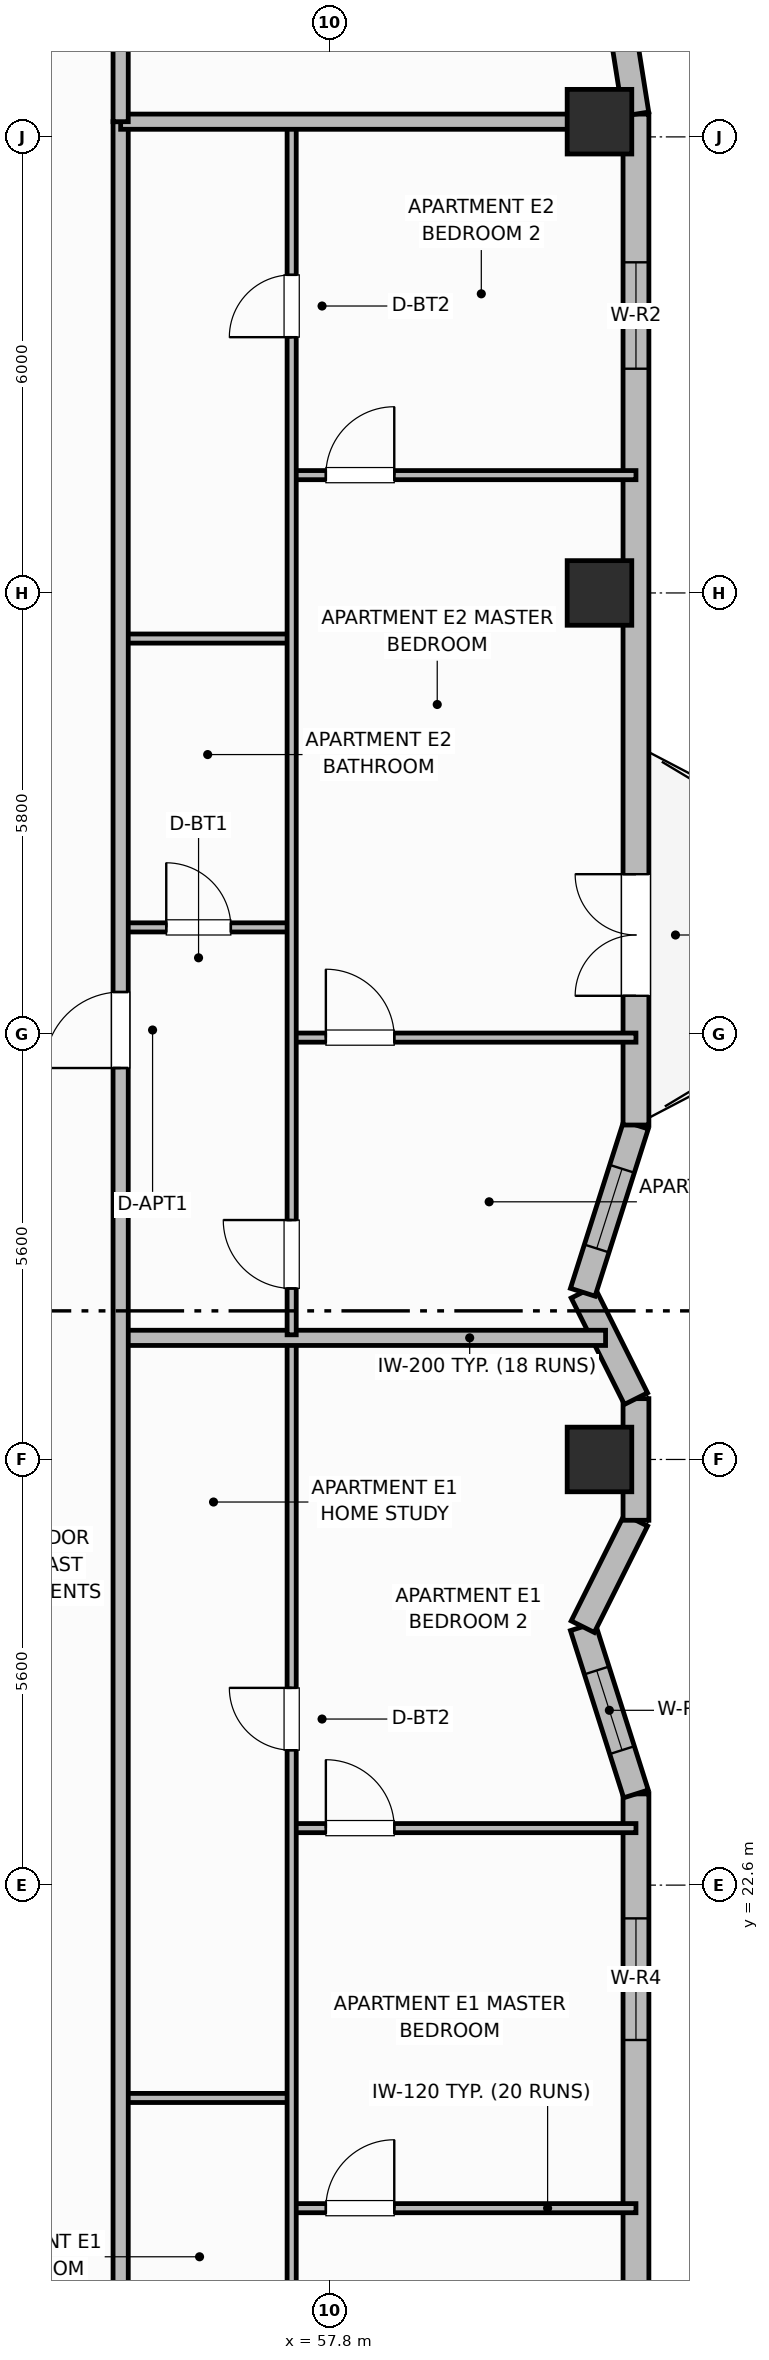
"""IFC4 building model, lengths in metres.
Left out: names, types, materials, properties, quantities, classifications, styles, units other than length and angle.
Written with IfcOpenShell. Run it as: python <this file> out.ifc"""

import sys

from ifc_helpers import new_model, si_unit, direction, frame, frame_2d, origin, origin_2d, place, context, subcontext, project, spatial, rectangle, extrude, element, fill, save


model = new_model("IFC4")
c1 = context("Model", 3, precision=1e-05, world=origin(), true_north=direction((0.0, 1.0)))
c2 = subcontext(c1, "Body", "Model", "MODEL_VIEW")
j1 = project(units=[si_unit("LENGTHUNIT", "METRE"), si_unit("PLANEANGLEUNIT", "RADIAN")], contexts=[c1])
p1 = place(None, origin())
s1 = spatial("IfcSite", under=j1, at=p1, CompositionType="ELEMENT")
p2 = place(p1, origin())
s2 = spatial("IfcBuilding", under=s1, at=p2, CompositionType="ELEMENT")
p3 = place(p2, frame((0.0, 0.0, 203.1)))
s3 = spatial("IfcBuildingStorey", under=s2, at=p3, CompositionType="ELEMENT", Elevation=203.1)
for number, where, z_axis, x_axis in (
    (1, (61.35, 28.2, 0.0), (0.0, 0.0, 1.0), (1.0, 0.0, 0.0)),
    (2, (61.35, 39.6, 0.0), (0.0, 0.0, 1.0), (1.0, 0.0, 0.0)),
    (3, (61.35, 45.8, 0.0), (0.0, 0.0, 1.0), (1.0, 0.0, 0.0)),
):
    element("IfcColumn", number, at=place(p3, frame(where, z_axis=z_axis, x_axis=x_axis)), inside=s3, PredefinedType="COLUMN", context=c2, shape_type="SweptSolid", body=[
        extrude(rectangle(XDim=0.85, YDim=0.85, at=origin_2d()), origin(), (0.0, 0.0, 1.0), 4.2),
    ])
p4 = place(p3, frame((61.83, 15.35, 0.0), z_axis=(0.0, 0.0, 1.0), x_axis=(0.0, 1.0, 0.0)))
e4 = element("IfcWall", 4, at=p4, inside=s3, PredefinedType="SOLIDWALL", context=c2, shape_type="SweptSolid", body=[
    extrude(rectangle(XDim=8.45, YDim=0.34, at=frame_2d((4.225, 0.0))), origin(), (0.0, 0.0, 1.0), 3.22),
])
p5 = place(p4, frame((5.212, 0.0, 0.85)))
e5 = element("IfcOpeningElement", 5, at=p5, cuts=e4, PredefinedType="OPENING", context=c2, shape_type="SweptSolid", body=[
    extrude(rectangle(XDim=1.6, YDim=1.9, at=frame_2d((0.8, 0.95))), frame((0.0, 0.18, 0.0), z_axis=(0.0, -1.0, 0.0), x_axis=(1.0, 0.0, 0.0)), (0.0, 0.0, 1.0), 0.36),
])
p6 = place(p3, frame((61.83, 23.8, 0.0), z_axis=(0.0, 0.0, 1.0), x_axis=(-0.303286588318, 0.95289938889, 0.0)))
e6 = element("IfcWall", 6, at=p6, inside=s3, PredefinedType="SOLIDWALL", context=c2, shape_type="SweptSolid", body=[
    extrude(rectangle(XDim=2.309, YDim=0.34, at=frame_2d((1.154, 0.0))), origin(), (0.0, 0.0, 1.0), 3.22),
])
p7 = place(p6, frame((0.604, 0.0, 0.95)))
e7 = element("IfcOpeningElement", 7, at=p7, cuts=e6, PredefinedType="OPENING", context=c2, shape_type="SweptSolid", body=[
    extrude(rectangle(XDim=1.1, YDim=1.65, at=frame_2d((0.55, 0.825))), frame((0.0, 0.18, 0.0), z_axis=(0.0, -1.0, 0.0), x_axis=(1.0, 0.0, 0.0)), (0.0, 0.0, 1.0), 0.36),
])
p8 = place(p3, frame((61.13, 26.0, 0.0), z_axis=(0.0, 0.0, 1.0), x_axis=(0.447338371726, 0.894364792007, 0.0)))
e8 = element("IfcWall", 8, at=p8, inside=s3, PredefinedType="SOLIDWALL", context=c2, shape_type="SweptSolid", body=[
    extrude(rectangle(XDim=1.565, YDim=0.34, at=frame_2d((0.783, 0.0))), origin(), (0.0, 0.0, 1.0), 3.22),
])
p9 = place(p3, frame((61.83, 27.4, 0.0), z_axis=(0.0, 0.0, 1.0), x_axis=(0.0, 1.0, 0.0)))
e9 = element("IfcWall", 9, at=p9, inside=s3, PredefinedType="SOLIDWALL", context=c2, shape_type="SweptSolid", body=[
    extrude(rectangle(XDim=1.6, YDim=0.34, at=frame_2d((0.8, 0.0))), origin(), (0.0, 0.0, 1.0), 3.22),
])
p10 = place(p3, frame((61.83, 29.0, 0.0), z_axis=(0.0, 0.0, 1.0), x_axis=(-0.447338371726, 0.894364792007, 0.0)))
e10 = element("IfcWall", 10, at=p10, inside=s3, PredefinedType="SOLIDWALL", context=c2, shape_type="SweptSolid", body=[
    extrude(rectangle(XDim=1.565, YDim=0.34, at=frame_2d((0.783, 0.0))), origin(), (0.0, 0.0, 1.0), 3.22),
])
p11 = place(p3, frame((61.13, 30.4, 0.0), z_axis=(0.0, 0.0, 1.0), x_axis=(0.303256029766, 0.952909114454, 0.0)))
e11 = element("IfcWall", 11, at=p11, inside=s3, PredefinedType="SOLIDWALL", context=c2, shape_type="SweptSolid", body=[
    extrude(rectangle(XDim=2.309, YDim=0.34, at=frame_2d((1.154, 0.0))), origin(), (0.0, 0.0, 1.0), 3.22),
])
p12 = place(p11, frame((0.604, 0.0, 0.95)))
e12 = element("IfcOpeningElement", 12, at=p12, cuts=e11, PredefinedType="OPENING", context=c2, shape_type="SweptSolid", body=[
    extrude(rectangle(XDim=1.1, YDim=1.65, at=frame_2d((0.55, 0.825))), frame((0.0, 0.18, 0.0), z_axis=(0.0, -1.0, 0.0), x_axis=(1.0, 0.0, 0.0)), (0.0, 0.0, 1.0), 0.36),
])
p13 = place(p3, frame((61.83, 32.6, 0.0), z_axis=(0.0, 0.0, 1.0), x_axis=(0.0, 1.0, 0.0)))
e13 = element("IfcWall", 13, at=p13, inside=s3, PredefinedType="SOLIDWALL", context=c2, shape_type="SweptSolid", body=[
    extrude(rectangle(XDim=13.3, YDim=0.34, at=frame_2d((6.65, 0.0))), origin(), (0.0, 0.0, 1.0), 3.22),
])
p14 = place(p13, frame((1.7, 0.0, 0.0)))
e14 = element("IfcOpeningElement", 14, at=p14, cuts=e13, PredefinedType="OPENING", context=c2, shape_type="SweptSolid", body=[
    extrude(rectangle(XDim=1.6, YDim=2.1, at=frame_2d((0.8, 1.05))), frame((0.0, 0.18, 0.0), z_axis=(0.0, -1.0, 0.0), x_axis=(1.0, 0.0, 0.0)), (0.0, 0.0, 1.0), 0.36),
])
p15 = place(p13, frame((9.95, 0.0, 0.85)))
e15 = element("IfcOpeningElement", 15, at=p15, cuts=e13, PredefinedType="OPENING", context=c2, shape_type="SweptSolid", body=[
    extrude(rectangle(XDim=1.4, YDim=1.85, at=frame_2d((0.7, 0.925))), frame((0.0, 0.18, 0.0), z_axis=(0.0, -1.0, 0.0), x_axis=(1.0, 0.0, 0.0)), (0.0, 0.0, 1.0), 0.36),
])
p16 = place(p3, frame((61.83, 45.9, 0.0), z_axis=(0.0, 0.0, 1.0), x_axis=(-0.156481329164, 0.987680916907, 0.0)))
e16 = element("IfcWall", 16, at=p16, inside=s3, PredefinedType="SOLIDWALL", context=c2, shape_type="SweptSolid", body=[
    extrude(rectangle(XDim=1.136, YDim=0.34, at=frame_2d((0.568, 0.0))), origin(), (0.0, 0.0, 1.0), 3.22),
])
p17 = place(p3, frame((55.05, 19.8, 0.0), z_axis=(0.0, 0.0, 1.0), x_axis=(1.0, 0.0, 0.0)))
e17 = element("IfcWall", 17, at=p17, inside=s3, PredefinedType="PARTITIONING", context=c2, shape_type="SweptSolid", body=[
    extrude(rectangle(XDim=2.25, YDim=0.12, at=frame_2d((1.125, 0.0))), origin(), (0.0, 0.0, 1.0), 3.05),
])
p18 = place(p3, frame((57.3, 18.35, 0.0), z_axis=(0.0, 0.0, 1.0), x_axis=(1.0, 0.0, 0.0)))
e18 = element("IfcWall", 18, at=p18, inside=s3, PredefinedType="PARTITIONING", context=c2, shape_type="SweptSolid", body=[
    extrude(rectangle(XDim=4.53, YDim=0.12, at=frame_2d((2.265, 0.0))), origin(), (0.0, 0.0, 1.0), 3.05),
])
p19 = place(p18, frame((0.45, 0.0, 0.0)))
e19 = element("IfcOpeningElement", 19, at=p19, cuts=e18, PredefinedType="OPENING", context=c2, shape_type="SweptSolid", body=[
    extrude(rectangle(XDim=0.9, YDim=2.1, at=frame_2d((0.45, 1.05))), frame((0.0, 0.07, 0.0), z_axis=(0.0, -1.0, 0.0), x_axis=(1.0, 0.0, 0.0)), (0.0, 0.0, 1.0), 0.14),
])
p20 = place(p3, frame((57.3, 23.35, 0.0), z_axis=(0.0, 0.0, 1.0), x_axis=(1.0, 0.0, 0.0)))
e20 = element("IfcWall", 20, at=p20, inside=s3, PredefinedType="PARTITIONING", context=c2, shape_type="SweptSolid", body=[
    extrude(rectangle(XDim=4.53, YDim=0.12, at=frame_2d((2.265, 0.0))), origin(), (0.0, 0.0, 1.0), 3.05),
])
p21 = place(p20, frame((0.45, 0.0, 0.0)))
e21 = element("IfcOpeningElement", 21, at=p21, cuts=e20, PredefinedType="OPENING", context=c2, shape_type="SweptSolid", body=[
    extrude(rectangle(XDim=0.9, YDim=2.1, at=frame_2d((0.45, 1.05))), frame((0.0, 0.07, 0.0), z_axis=(0.0, -1.0, 0.0), x_axis=(1.0, 0.0, 0.0)), (0.0, 0.0, 1.0), 0.14),
])
p22 = place(p3, frame((57.3, 10.64, 0.0), z_axis=(0.0, 0.0, 1.0), x_axis=(0.0, 1.0, 0.0)))
e22 = element("IfcWall", 22, at=p22, inside=s3, PredefinedType="PARTITIONING", context=c2, shape_type="SweptSolid", body=[
    extrude(rectangle(XDim=19.12, YDim=0.12, at=frame_2d((9.56, 0.0))), origin(), (0.0, 0.0, 1.0), 3.05),
])
p23 = place(p22, frame((0.41, 0.0, 0.0)))
e23 = element("IfcOpeningElement", 23, at=p23, cuts=e22, PredefinedType="OPENING", context=c2, shape_type="SweptSolid", body=[
    extrude(rectangle(XDim=0.9, YDim=2.1, at=frame_2d((0.45, 1.05))), frame((0.0, 0.07, 0.0), z_axis=(0.0, -1.0, 0.0), x_axis=(1.0, 0.0, 0.0)), (0.0, 0.0, 1.0), 0.14),
])
p24 = place(p22, frame((13.735, 0.0, 0.0)))
e24 = element("IfcOpeningElement", 24, at=p24, cuts=e22, PredefinedType="OPENING", context=c2, shape_type="SweptSolid", body=[
    extrude(rectangle(XDim=0.82, YDim=2.08, at=frame_2d((0.41, 1.04))), frame((0.0, 0.07, 0.0), z_axis=(0.0, -1.0, 0.0), x_axis=(1.0, 0.0, 0.0)), (0.0, 0.0, 1.0), 0.14),
])
p25 = place(p3, frame((55.05, 29.8, 0.0), z_axis=(0.0, 0.0, 1.0), x_axis=(1.0, 0.0, 0.0)))
e25 = element("IfcWall", 25, at=p25, inside=s3, PredefinedType="PARTITIONING", context=c2, shape_type="SweptSolid", body=[
    extrude(rectangle(XDim=6.38, YDim=0.2, at=frame_2d((3.19, 0.0))), origin(), (0.0, 0.0, 1.0), 3.05),
])
p26 = place(p3, frame((55.05, 35.2, 0.0), z_axis=(0.0, 0.0, 1.0), x_axis=(1.0, 0.0, 0.0)))
e26 = element("IfcWall", 26, at=p26, inside=s3, PredefinedType="PARTITIONING", context=c2, shape_type="SweptSolid", body=[
    extrude(rectangle(XDim=2.25, YDim=0.12, at=frame_2d((1.125, 0.0))), origin(), (0.0, 0.0, 1.0), 3.05),
])
p27 = place(p26, frame((0.6, 0.0, 0.0)))
e27 = element("IfcOpeningElement", 27, at=p27, cuts=e26, PredefinedType="OPENING", context=c2, shape_type="SweptSolid", body=[
    extrude(rectangle(XDim=0.85, YDim=2.1, at=frame_2d((0.425, 1.05))), frame((0.0, 0.07, 0.0), z_axis=(0.0, -1.0, 0.0), x_axis=(1.0, 0.0, 0.0)), (0.0, 0.0, 1.0), 0.14),
])
p28 = place(p3, frame((55.05, 39.0, 0.0), z_axis=(0.0, 0.0, 1.0), x_axis=(1.0, 0.0, 0.0)))
e28 = element("IfcWall", 28, at=p28, inside=s3, PredefinedType="PARTITIONING", context=c2, shape_type="SweptSolid", body=[
    extrude(rectangle(XDim=2.25, YDim=0.12, at=frame_2d((1.125, 0.0))), origin(), (0.0, 0.0, 1.0), 3.05),
])
p29 = place(p3, frame((57.3, 33.75, 0.0), z_axis=(0.0, 0.0, 1.0), x_axis=(1.0, 0.0, 0.0)))
e29 = element("IfcWall", 29, at=p29, inside=s3, PredefinedType="PARTITIONING", context=c2, shape_type="SweptSolid", body=[
    extrude(rectangle(XDim=4.53, YDim=0.12, at=frame_2d((2.265, 0.0))), origin(), (0.0, 0.0, 1.0), 3.05),
])
p30 = place(p29, frame((0.45, 0.0, 0.0)))
e30 = element("IfcOpeningElement", 30, at=p30, cuts=e29, PredefinedType="OPENING", context=c2, shape_type="SweptSolid", body=[
    extrude(rectangle(XDim=0.9, YDim=2.1, at=frame_2d((0.45, 1.05))), frame((0.0, 0.07, 0.0), z_axis=(0.0, -1.0, 0.0), x_axis=(1.0, 0.0, 0.0)), (0.0, 0.0, 1.0), 0.14),
])
p31 = place(p3, frame((57.3, 41.15, 0.0), z_axis=(0.0, 0.0, 1.0), x_axis=(1.0, 0.0, 0.0)))
e31 = element("IfcWall", 31, at=p31, inside=s3, PredefinedType="PARTITIONING", context=c2, shape_type="SweptSolid", body=[
    extrude(rectangle(XDim=4.53, YDim=0.12, at=frame_2d((2.265, 0.0))), origin(), (0.0, 0.0, 1.0), 3.05),
])
p32 = place(p31, frame((0.45, 0.0, 0.0)))
e32 = element("IfcOpeningElement", 32, at=p32, cuts=e31, PredefinedType="OPENING", context=c2, shape_type="SweptSolid", body=[
    extrude(rectangle(XDim=0.9, YDim=2.1, at=frame_2d((0.45, 1.05))), frame((0.0, 0.07, 0.0), z_axis=(0.0, -1.0, 0.0), x_axis=(1.0, 0.0, 0.0)), (0.0, 0.0, 1.0), 0.14),
])
p33 = place(p3, frame((57.3, 29.84, 0.0), z_axis=(0.0, 0.0, 1.0), x_axis=(0.0, 1.0, 0.0)))
e33 = element("IfcWall", 33, at=p33, inside=s3, PredefinedType="PARTITIONING", context=c2, shape_type="SweptSolid", body=[
    extrude(rectangle(XDim=15.92, YDim=0.12, at=frame_2d((7.96, 0.0))), origin(), (0.0, 0.0, 1.0), 3.05),
])
p34 = place(p33, frame((0.61, 0.0, 0.0)))
e34 = element("IfcOpeningElement", 34, at=p34, cuts=e33, PredefinedType="OPENING", context=c2, shape_type="SweptSolid", body=[
    extrude(rectangle(XDim=0.9, YDim=2.1, at=frame_2d((0.45, 1.05))), frame((0.0, 0.07, 0.0), z_axis=(0.0, -1.0, 0.0), x_axis=(1.0, 0.0, 0.0)), (0.0, 0.0, 1.0), 0.14),
])
p35 = place(p33, frame((13.125, 0.0, 0.0)))
e35 = element("IfcOpeningElement", 35, at=p35, cuts=e33, PredefinedType="OPENING", context=c2, shape_type="SweptSolid", body=[
    extrude(rectangle(XDim=0.82, YDim=2.08, at=frame_2d((0.41, 1.04))), frame((0.0, 0.07, 0.0), z_axis=(0.0, -1.0, 0.0), x_axis=(1.0, 0.0, 0.0)), (0.0, 0.0, 1.0), 0.14),
])
p36 = place(p3, frame((55.05, 10.6, 0.0), z_axis=(0.0, 0.0, 1.0), x_axis=(0.0, 1.0, 0.0)))
e36 = element("IfcWall", 36, at=p36, inside=s3, PredefinedType="PARTITIONING", context=c2, shape_type="SweptSolid", body=[
    extrude(rectangle(XDim=35.2, YDim=0.2, at=frame_2d((17.6, 0.0))), origin(), (0.0, 0.0, 1.0), 3.05),
])
p37 = place(p36, frame((2.65, 0.0, 0.0)))
e37 = element("IfcOpeningElement", 37, at=p37, cuts=e36, PredefinedType="OPENING", context=c2, shape_type="SweptSolid", body=[
    extrude(rectangle(XDim=1.0, YDim=2.15, at=frame_2d((0.5, 1.075))), frame((0.0, 0.11, 0.0), z_axis=(0.0, -1.0, 0.0), x_axis=(1.0, 0.0, 0.0)), (0.0, 0.0, 1.0), 0.22),
])
p38 = place(p36, frame((22.75, 0.0, 0.0)))
e38 = element("IfcOpeningElement", 38, at=p38, cuts=e36, PredefinedType="OPENING", context=c2, shape_type="SweptSolid", body=[
    extrude(rectangle(XDim=1.0, YDim=2.15, at=frame_2d((0.5, 1.075))), frame((0.0, 0.11, 0.0), z_axis=(0.0, -1.0, 0.0), x_axis=(1.0, 0.0, 0.0)), (0.0, 0.0, 1.0), 0.22),
])
p39 = place(p3, frame((55.05, 45.8, 0.0), z_axis=(0.0, 0.0, 1.0), x_axis=(1.0, 0.0, 0.0)))
e39 = element("IfcWall", 39, at=p39, inside=s3, PredefinedType="PARTITIONING", context=c2, shape_type="SweptSolid", body=[
    extrude(rectangle(XDim=6.36, YDim=0.2, at=frame_2d((3.18, 0.0))), origin(), (0.0, 0.0, 1.0), 3.05),
])
p40 = place(p3, frame((55.05, 45.8, 0.0), z_axis=(0.0, 0.0, 1.0), x_axis=(0.0, 1.0, 0.0)))
e40 = element("IfcWall", 40, at=p40, inside=s3, PredefinedType="PARTITIONING", context=c2, shape_type="SweptSolid", body=[
    extrude(rectangle(XDim=3.73, YDim=0.2, at=frame_2d((1.865, 0.0))), origin(), (0.0, 0.0, 1.0), 3.05),
])
p41 = place(p5, origin())
e41 = element("IfcWindow", 41, at=p41, inside=s3, PartitioningType="SINGLE_PANEL", PredefinedType="WINDOW", context=c2, shape_type="SweptSolid", body=[
    extrude(rectangle(XDim=1.6, YDim=1.9, at=frame_2d((0.8, 0.95))), frame((0.0, 0.03, 0.0), z_axis=(0.0, -1.0, 0.0), x_axis=(1.0, 0.0, 0.0)), (0.0, 0.0, 1.0), 0.06),
])
fill(e5, e41)
p42 = place(p7, origin())
e42 = element("IfcWindow", 42, at=p42, inside=s3, PartitioningType="SINGLE_PANEL", PredefinedType="WINDOW", context=c2, shape_type="SweptSolid", body=[
    extrude(rectangle(XDim=1.1, YDim=1.65, at=frame_2d((0.55, 0.825))), frame((0.0, 0.03, 0.0), z_axis=(0.0, -1.0, 0.0), x_axis=(1.0, 0.0, 0.0)), (0.0, 0.0, 1.0), 0.06),
])
fill(e7, e42)
p43 = place(p12, origin())
e43 = element("IfcWindow", 43, at=p43, inside=s3, PartitioningType="SINGLE_PANEL", PredefinedType="WINDOW", context=c2, shape_type="SweptSolid", body=[
    extrude(rectangle(XDim=1.1, YDim=1.65, at=frame_2d((0.55, 0.825))), frame((0.0, 0.03, 0.0), z_axis=(0.0, -1.0, 0.0), x_axis=(1.0, 0.0, 0.0)), (0.0, 0.0, 1.0), 0.06),
])
fill(e12, e43)
p44 = place(p14, origin())
e44 = element("IfcDoor", 44, at=p44, inside=s3, OperationType="DOUBLE_DOOR_SINGLE_SWING", PredefinedType="DOOR", context=c2, shape_type="SweptSolid", body=[
    extrude(rectangle(XDim=1.6, YDim=2.1, at=frame_2d((0.8, 1.05))), frame((0.0, 0.025, 0.0), z_axis=(0.0, -1.0, 0.0), x_axis=(1.0, 0.0, 0.0)), (0.0, 0.0, 1.0), 0.05),
])
fill(e14, e44)
p45 = place(p15, origin())
e45 = element("IfcWindow", 45, at=p45, inside=s3, PartitioningType="SINGLE_PANEL", PredefinedType="WINDOW", context=c2, shape_type="SweptSolid", body=[
    extrude(rectangle(XDim=1.4, YDim=1.85, at=frame_2d((0.7, 0.925))), frame((0.0, 0.03, 0.0), z_axis=(0.0, -1.0, 0.0), x_axis=(1.0, 0.0, 0.0)), (0.0, 0.0, 1.0), 0.06),
])
fill(e15, e45)
p46 = place(p19, origin())
e46 = element("IfcDoor", 46, at=p46, inside=s3, OperationType="SINGLE_SWING_RIGHT", PredefinedType="DOOR", context=c2, shape_type="SweptSolid", body=[
    extrude(rectangle(XDim=0.9, YDim=2.1, at=frame_2d((0.45, 1.05))), frame((0.0, 0.025, 0.0), z_axis=(0.0, -1.0, 0.0), x_axis=(1.0, 0.0, 0.0)), (0.0, 0.0, 1.0), 0.05),
])
fill(e19, e46)
p47 = place(p21, origin())
e47 = element("IfcDoor", 47, at=p47, inside=s3, OperationType="SINGLE_SWING_LEFT", PredefinedType="DOOR", context=c2, shape_type="SweptSolid", body=[
    extrude(rectangle(XDim=0.9, YDim=2.1, at=frame_2d((0.45, 1.05))), frame((0.0, 0.025, 0.0), z_axis=(0.0, -1.0, 0.0), x_axis=(1.0, 0.0, 0.0)), (0.0, 0.0, 1.0), 0.05),
])
fill(e21, e47)
p48 = place(p24, origin())
e48 = element("IfcDoor", 48, at=p48, inside=s3, OperationType="SINGLE_SWING_RIGHT", PredefinedType="DOOR", context=c2, shape_type="SweptSolid", body=[
    extrude(rectangle(XDim=0.82, YDim=2.08, at=frame_2d((0.41, 1.04))), frame((0.0, 0.025, 0.0), z_axis=(0.0, -1.0, 0.0), x_axis=(1.0, 0.0, 0.0)), (0.0, 0.0, 1.0), 0.05),
])
fill(e24, e48)
p49 = place(p27, origin())
e49 = element("IfcDoor", 49, at=p49, inside=s3, OperationType="SINGLE_SWING_LEFT", PredefinedType="DOOR", context=c2, shape_type="SweptSolid", body=[
    extrude(rectangle(XDim=0.85, YDim=2.1, at=frame_2d((0.425, 1.05))), frame((0.0, 0.025, 0.0), z_axis=(0.0, -1.0, 0.0), x_axis=(1.0, 0.0, 0.0)), (0.0, 0.0, 1.0), 0.05),
])
fill(e27, e49)
p50 = place(p30, origin())
e50 = element("IfcDoor", 50, at=p50, inside=s3, OperationType="SINGLE_SWING_LEFT", PredefinedType="DOOR", context=c2, shape_type="SweptSolid", body=[
    extrude(rectangle(XDim=0.9, YDim=2.1, at=frame_2d((0.45, 1.05))), frame((0.0, 0.025, 0.0), z_axis=(0.0, -1.0, 0.0), x_axis=(1.0, 0.0, 0.0)), (0.0, 0.0, 1.0), 0.05),
])
fill(e30, e50)
p51 = place(p32, origin())
e51 = element("IfcDoor", 51, at=p51, inside=s3, OperationType="SINGLE_SWING_RIGHT", PredefinedType="DOOR", context=c2, shape_type="SweptSolid", body=[
    extrude(rectangle(XDim=0.9, YDim=2.1, at=frame_2d((0.45, 1.05))), frame((0.0, 0.025, 0.0), z_axis=(0.0, -1.0, 0.0), x_axis=(1.0, 0.0, 0.0)), (0.0, 0.0, 1.0), 0.05),
])
fill(e32, e51)
p52 = place(p34, origin())
e52 = element("IfcDoor", 52, at=p52, inside=s3, OperationType="SINGLE_SWING_RIGHT", PredefinedType="DOOR", context=c2, shape_type="SweptSolid", body=[
    extrude(rectangle(XDim=0.9, YDim=2.1, at=frame_2d((0.45, 1.05))), frame((0.0, 0.025, 0.0), z_axis=(0.0, -1.0, 0.0), x_axis=(1.0, 0.0, 0.0)), (0.0, 0.0, 1.0), 0.05),
])
fill(e34, e52)
p53 = place(p35, origin())
e53 = element("IfcDoor", 53, at=p53, inside=s3, OperationType="SINGLE_SWING_LEFT", PredefinedType="DOOR", context=c2, shape_type="SweptSolid", body=[
    extrude(rectangle(XDim=0.82, YDim=2.08, at=frame_2d((0.41, 1.04))), frame((0.0, 0.025, 0.0), z_axis=(0.0, -1.0, 0.0), x_axis=(1.0, 0.0, 0.0)), (0.0, 0.0, 1.0), 0.05),
])
fill(e35, e53)
p54 = place(p38, origin())
e54 = element("IfcDoor", 54, at=p54, inside=s3, OperationType="SINGLE_SWING_LEFT", PredefinedType="DOOR", context=c2, shape_type="SweptSolid", body=[
    extrude(rectangle(XDim=1.0, YDim=2.15, at=frame_2d((0.5, 1.075))), frame((0.0, 0.025, 0.0), z_axis=(0.0, -1.0, 0.0), x_axis=(1.0, 0.0, 0.0)), (0.0, 0.0, 1.0), 0.05),
])
fill(e38, e54)
save(model, sys.argv[1])
